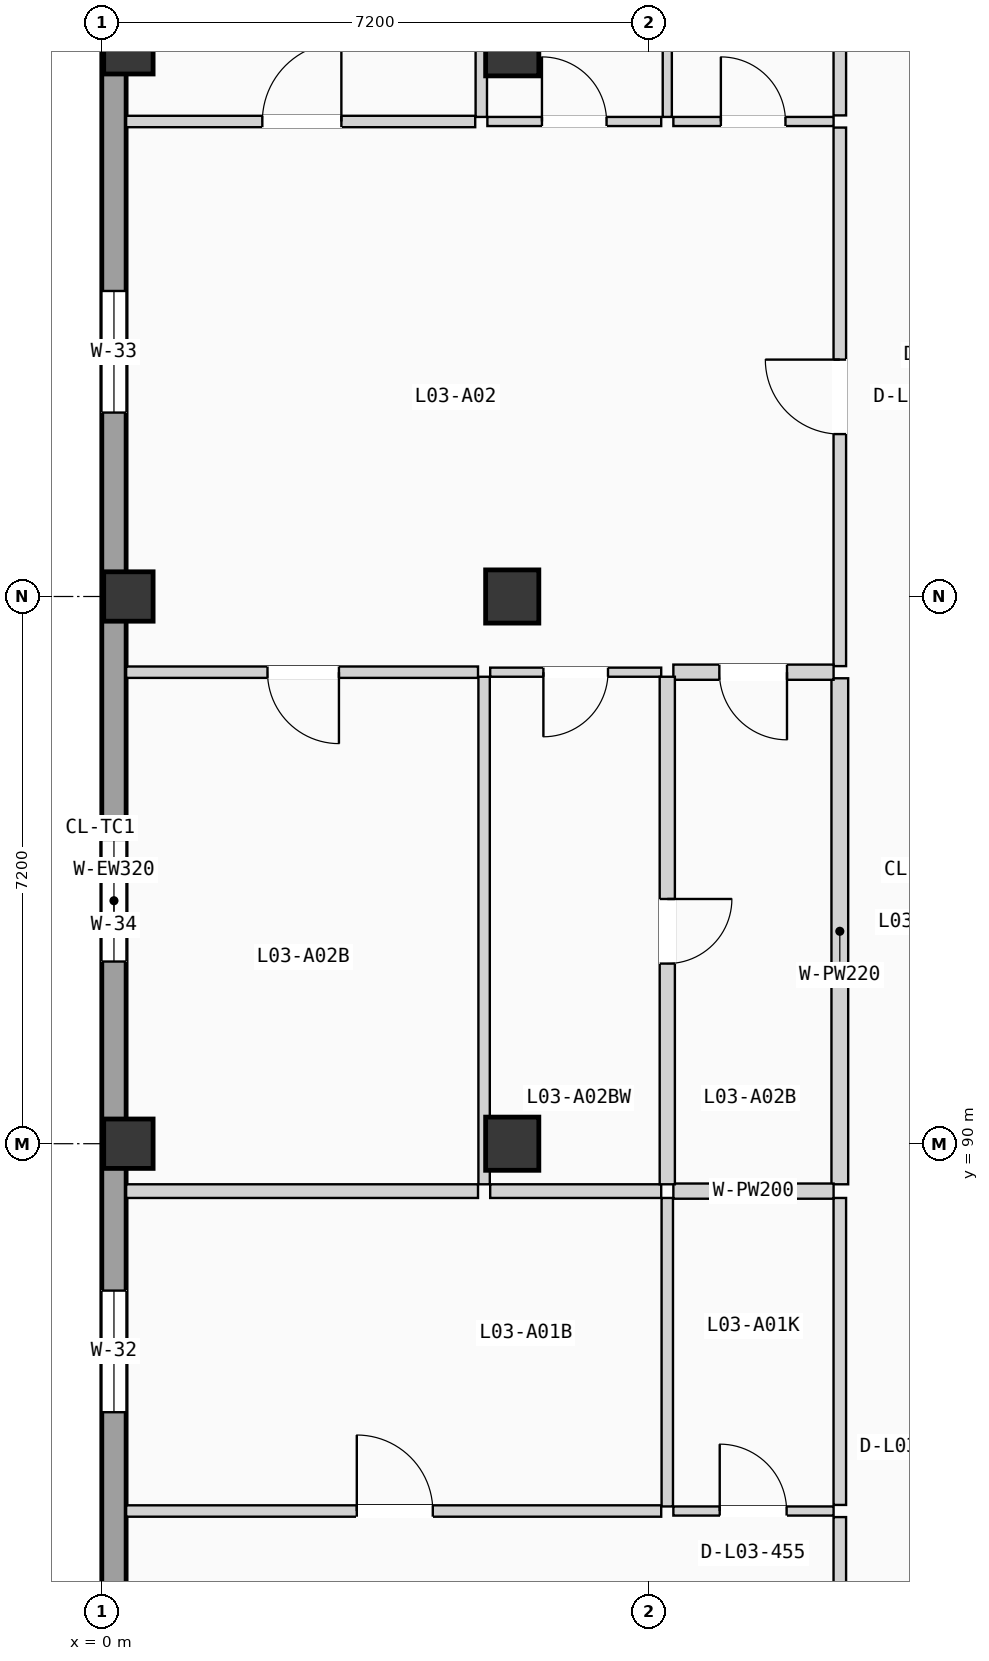
"""IFC4 building model, lengths in metres.
Left out: names, types, materials, properties, quantities, classifications, styles, units other than length and angle.
Written with IfcOpenShell. Run it as: python <this file> out.ifc"""

import sys

from ifc_helpers import new_model, si_unit, direction, frame, frame_2d, origin, origin_2d, place, context, subcontext, project, spatial, rectangle, extrude, element, fill, save


model = new_model("IFC4")
c1 = context("Model", 3, precision=1e-05, world=origin(), true_north=direction((0.0, 1.0)))
c2 = subcontext(c1, "Body", "Model", "MODEL_VIEW")
j1 = project(units=[si_unit("LENGTHUNIT", "METRE"), si_unit("PLANEANGLEUNIT", "RADIAN")], contexts=[c1])
p1 = place(None, origin())
s1 = spatial("IfcSite", under=j1, at=p1, CompositionType="ELEMENT")
p2 = place(p1, origin())
s2 = spatial("IfcBuilding", under=s1, at=p2, CompositionType="ELEMENT")
p3 = place(p2, frame((0.0, 0.0, 12.075)))
s3 = spatial("IfcBuildingStorey", under=s2, at=p3, CompositionType="ELEMENT", Elevation=12.075)
for number, where, z_axis, x_axis in (
    (1, (0.35, 90.0, 0.0), (0.0, 0.0, 1.0), (1.0, 0.0, 0.0)),
    (2, (0.35, 97.2, 0.0), (0.0, 0.0, 1.0), (1.0, 0.0, 0.0)),
    (3, (0.35, 104.4, 0.0), (0.0, 0.0, 1.0), (1.0, 0.0, 0.0)),
):
    element("IfcColumn", number, at=place(p3, frame(where, z_axis=z_axis, x_axis=x_axis)), inside=s3, PredefinedType="COLUMN", context=c2, shape_type="SweptSolid", body=[
        extrude(rectangle(XDim=0.65, YDim=0.65, at=origin_2d()), origin(), (0.0, 0.0, 1.0), 3.15),
    ])
for number, where, z_axis, x_axis in (
    (4, (5.4, 90.0, 0.0), (0.0, 0.0, 1.0), (1.0, 0.0, 0.0)),
    (5, (5.4, 97.2, 0.0), (0.0, 0.0, 1.0), (1.0, 0.0, 0.0)),
    (6, (5.4, 104.4, 0.0), (0.0, 0.0, 1.0), (1.0, 0.0, 0.0)),
):
    element("IfcColumn", number, at=place(p3, frame(where, z_axis=z_axis, x_axis=x_axis)), inside=s3, PredefinedType="COLUMN", context=c2, shape_type="SweptSolid", body=[
        extrude(rectangle(XDim=0.7, YDim=0.7, at=origin_2d()), origin(), (0.0, 0.0, 1.0), 3.15),
    ])
p4 = place(p3, frame((0.16, 68.72, 0.0), z_axis=(0.0, 0.0, 1.0), x_axis=(0.0, 1.0, 0.0)))
e7 = element("IfcWall", 7, at=p4, inside=s3, PredefinedType="SOLIDWALL", context=c2, shape_type="SweptSolid", body=[
    extrude(rectangle(XDim=49.76, YDim=0.32, at=frame_2d((24.88, 0.0))), origin(), (0.0, 0.0, 1.0), 2.89),
])
p5 = place(p4, frame((12.169, 0.0, 0.85)))
e8 = element("IfcOpeningElement", 8, at=p5, cuts=e7, PredefinedType="OPENING", context=c2, shape_type="SweptSolid", body=[
    extrude(rectangle(XDim=0.95, YDim=1.2, at=frame_2d((0.475, 0.6))), frame((0.0, 0.17, 0.0), z_axis=(0.0, -1.0, 0.0), x_axis=(1.0, 0.0, 0.0)), (0.0, 0.0, 1.0), 0.34),
])
p6 = place(p4, frame((8.499, 0.0, 0.9)))
e9 = element("IfcOpeningElement", 9, at=p6, cuts=e7, PredefinedType="OPENING", context=c2, shape_type="SweptSolid", body=[
    extrude(rectangle(XDim=1.6, YDim=1.2, at=frame_2d((0.8, 0.6))), frame((0.0, 0.17, 0.0), z_axis=(0.0, -1.0, 0.0), x_axis=(1.0, 0.0, 0.0)), (0.0, 0.0, 1.0), 0.34),
])
p7 = place(p4, frame((17.747, 0.0, 0.855)))
e10 = element("IfcOpeningElement", 10, at=p7, cuts=e7, PredefinedType="OPENING", context=c2, shape_type="SweptSolid", body=[
    extrude(rectangle(XDim=1.6, YDim=1.35, at=frame_2d((0.8, 0.675))), frame((0.0, 0.17, 0.0), z_axis=(0.0, -1.0, 0.0), x_axis=(1.0, 0.0, 0.0)), (0.0, 0.0, 1.0), 0.34),
])
p8 = place(p4, frame((30.9, 0.0, 0.705)))
e11 = element("IfcOpeningElement", 11, at=p8, cuts=e7, PredefinedType="OPENING", context=c2, shape_type="SweptSolid", body=[
    extrude(rectangle(XDim=1.6, YDim=1.5, at=frame_2d((0.8, 0.75))), frame((0.0, 0.17, 0.0), z_axis=(0.0, -1.0, 0.0), x_axis=(1.0, 0.0, 0.0)), (0.0, 0.0, 1.0), 0.34),
])
p9 = place(p4, frame((23.677, 0.0, 0.555)))
e12 = element("IfcOpeningElement", 12, at=p9, cuts=e7, PredefinedType="OPENING", context=c2, shape_type="SweptSolid", body=[
    extrude(rectangle(XDim=1.6, YDim=1.65, at=frame_2d((0.8, 0.825))), frame((0.0, 0.17, 0.0), z_axis=(0.0, -1.0, 0.0), x_axis=(1.0, 0.0, 0.0)), (0.0, 0.0, 1.0), 0.34),
])
p10 = place(p4, frame((38.74, 0.0, 0.85)))
e13 = element("IfcOpeningElement", 13, at=p10, cuts=e7, PredefinedType="OPENING", context=c2, shape_type="SweptSolid", body=[
    extrude(rectangle(XDim=0.95, YDim=1.2, at=frame_2d((0.475, 0.6))), frame((0.0, 0.17, 0.0), z_axis=(0.0, -1.0, 0.0), x_axis=(1.0, 0.0, 0.0)), (0.0, 0.0, 1.0), 0.34),
])
p11 = place(p3, frame((9.71, 80.199, 0.0), z_axis=(0.0, 0.0, 1.0), x_axis=(0.0, 1.0, 0.0)))
e14 = element("IfcWall", 14, at=p11, inside=s3, PredefinedType="PARTITIONING", context=c2, shape_type="SweptSolid", body=[
    extrude(rectangle(XDim=4.888, YDim=0.165, at=frame_2d((2.444, 0.0))), origin(), (0.0, 0.0, 1.0), 2.87),
])
p12 = place(p11, frame((1.954, 0.0, 0.0)))
e15 = element("IfcOpeningElement", 15, at=p12, cuts=e14, PredefinedType="OPENING", context=c2, shape_type="SweptSolid", body=[
    extrude(rectangle(XDim=0.98, YDim=2.08, at=frame_2d((0.49, 1.04))), frame((0.0, 0.093, 0.0), z_axis=(0.0, -1.0, 0.0), x_axis=(1.0, 0.0, 0.0)), (0.0, 0.0, 1.0), 0.185),
])
p13 = place(p3, frame((9.71, 85.247, 0.0), z_axis=(0.0, 0.0, 1.0), x_axis=(0.0, 1.0, 0.0)))
e16 = element("IfcWall", 16, at=p13, inside=s3, PredefinedType="PARTITIONING", context=c2, shape_type="SweptSolid", body=[
    extrude(rectangle(XDim=4.039, YDim=0.165, at=frame_2d((2.02, 0.0))), origin(), (0.0, 0.0, 1.0), 2.87),
])
p14 = place(p3, frame((9.71, 96.284, 0.0), z_axis=(0.0, 0.0, 1.0), x_axis=(0.0, 1.0, 0.0)))
e17 = element("IfcWall", 17, at=p14, inside=s3, PredefinedType="PARTITIONING", context=c2, shape_type="SweptSolid", body=[
    extrude(rectangle(XDim=7.086, YDim=0.165, at=frame_2d((3.543, 0.0))), origin(), (0.0, 0.0, 1.0), 2.87),
])
p15 = place(p14, frame((3.053, 0.0, 0.0)))
e18 = element("IfcOpeningElement", 18, at=p15, cuts=e17, PredefinedType="OPENING", context=c2, shape_type="SweptSolid", body=[
    extrude(rectangle(XDim=0.98, YDim=2.08, at=frame_2d((0.49, 1.04))), frame((0.0, 0.093, 0.0), z_axis=(0.0, -1.0, 0.0), x_axis=(1.0, 0.0, 0.0)), (0.0, 0.0, 1.0), 0.185),
])
p16 = place(p3, frame((9.71, 89.466, 0.0), z_axis=(0.0, 0.0, 1.0), x_axis=(0.0, 1.0, 0.0)))
e19 = element("IfcWall", 19, at=p16, inside=s3, PredefinedType="PLUMBINGWALL", context=c2, shape_type="SweptSolid", body=[
    extrude(rectangle(XDim=6.658, YDim=0.22, at=frame_2d((3.329, 0.0))), origin(), (0.0, 0.0, 1.0), 2.87),
])
p17 = place(p3, frame((9.71, 103.53, 0.0), z_axis=(0.0, 0.0, 1.0), x_axis=(0.0, 1.0, 0.0)))
e20 = element("IfcWall", 20, at=p17, inside=s3, PredefinedType="PARTITIONING", context=c2, shape_type="SweptSolid", body=[
    extrude(rectangle(XDim=7.67, YDim=0.165, at=frame_2d((3.835, 0.0))), origin(), (0.0, 0.0, 1.0), 2.87),
])
p18 = place(p3, frame((7.52, 85.167, 0.0), z_axis=(0.0, 0.0, 1.0), x_axis=(1.0, 0.0, 0.0)))
e21 = element("IfcWall", 21, at=p18, inside=s3, PredefinedType="PARTITIONING", context=c2, shape_type="SweptSolid", body=[
    extrude(rectangle(XDim=2.108, YDim=0.12, at=frame_2d((1.054, 0.0))), origin(), (0.0, 0.0, 1.0), 2.87),
])
p19 = place(p18, frame((0.61, 0.0, 0.0)))
e22 = element("IfcOpeningElement", 22, at=p19, cuts=e21, PredefinedType="OPENING", context=c2, shape_type="SweptSolid", body=[
    extrude(rectangle(XDim=0.88, YDim=2.02, at=frame_2d((0.44, 1.01))), frame((0.0, 0.07, 0.0), z_axis=(0.0, -1.0, 0.0), x_axis=(1.0, 0.0, 0.0)), (0.0, 0.0, 1.0), 0.14),
])
p20 = place(p3, frame((0.32, 85.167, 0.0), z_axis=(0.0, 0.0, 1.0), x_axis=(1.0, 0.0, 0.0)))
e23 = element("IfcWall", 23, at=p20, inside=s3, PredefinedType="PARTITIONING", context=c2, shape_type="SweptSolid", body=[
    extrude(rectangle(XDim=7.04, YDim=0.15, at=frame_2d((3.52, 0.0))), origin(), (0.0, 0.0, 1.0), 2.87),
])
p21 = place(p20, frame((3.035, 0.0, 0.0)))
e24 = element("IfcOpeningElement", 24, at=p21, cuts=e23, PredefinedType="OPENING", context=c2, shape_type="SweptSolid", body=[
    extrude(rectangle(XDim=1.0, YDim=2.06, at=frame_2d((0.5, 1.03))), frame((0.0, 0.085, 0.0), z_axis=(0.0, -1.0, 0.0), x_axis=(1.0, 0.0, 0.0)), (0.0, 0.0, 1.0), 0.17),
])
p22 = place(p3, frame((7.44, 85.227, 0.0), z_axis=(0.0, 0.0, 1.0), x_axis=(0.0, 1.0, 0.0)))
e25 = element("IfcWall", 25, at=p22, inside=s3, PredefinedType="PARTITIONING", context=c2, shape_type="SweptSolid", body=[
    extrude(rectangle(XDim=4.059, YDim=0.15, at=frame_2d((2.029, 0.0))), origin(), (0.0, 0.0, 1.0), 2.87),
])
p23 = place(p3, frame((7.52, 89.376, 0.0), z_axis=(0.0, 0.0, 1.0), x_axis=(1.0, 0.0, 0.0)))
e26 = element("IfcWall", 26, at=p23, inside=s3, PredefinedType="PLUMBINGWALL", context=c2, shape_type="SweptSolid", body=[
    extrude(rectangle(XDim=2.108, YDim=0.2, at=frame_2d((1.054, 0.0))), origin(), (0.0, 0.0, 1.0), 2.87),
])
p24 = place(p3, frame((0.32, 89.376, 0.0), z_axis=(0.0, 0.0, 1.0), x_axis=(1.0, 0.0, 0.0)))
e27 = element("IfcWall", 27, at=p24, inside=s3, PredefinedType="PARTITIONING", context=c2, shape_type="SweptSolid", body=[
    extrude(rectangle(XDim=4.63, YDim=0.18, at=frame_2d((2.315, 0.0))), origin(), (0.0, 0.0, 1.0), 2.87),
])
p25 = place(p3, frame((5.11, 89.376, 0.0), z_axis=(0.0, 0.0, 1.0), x_axis=(1.0, 0.0, 0.0)))
e28 = element("IfcWall", 28, at=p25, inside=s3, PredefinedType="PARTITIONING", context=c2, shape_type="SweptSolid", body=[
    extrude(rectangle(XDim=2.25, YDim=0.18, at=frame_2d((1.125, 0.0))), origin(), (0.0, 0.0, 1.0), 2.87),
])
p26 = place(p3, frame((7.52, 96.204, 0.0), z_axis=(0.0, 0.0, 1.0), x_axis=(1.0, 0.0, 0.0)))
e29 = element("IfcWall", 29, at=p26, inside=s3, PredefinedType="PLUMBINGWALL", context=c2, shape_type="SweptSolid", body=[
    extrude(rectangle(XDim=2.108, YDim=0.2, at=frame_2d((1.054, 0.0))), origin(), (0.0, 0.0, 1.0), 2.87),
])
p27 = place(p26, frame((0.605, 0.0, 0.0)))
e30 = element("IfcOpeningElement", 30, at=p27, cuts=e29, PredefinedType="OPENING", context=c2, shape_type="SweptSolid", body=[
    extrude(rectangle(XDim=0.89, YDim=2.03, at=frame_2d((0.445, 1.015))), frame((0.0, 0.11, 0.0), z_axis=(0.0, -1.0, 0.0), x_axis=(1.0, 0.0, 0.0)), (0.0, 0.0, 1.0), 0.22),
])
p28 = place(p3, frame((7.52, 103.45, 0.0), z_axis=(0.0, 0.0, 1.0), x_axis=(1.0, 0.0, 0.0)))
e31 = element("IfcWall", 31, at=p28, inside=s3, PredefinedType="PARTITIONING", context=c2, shape_type="SweptSolid", body=[
    extrude(rectangle(XDim=2.108, YDim=0.12, at=frame_2d((1.054, 0.0))), origin(), (0.0, 0.0, 1.0), 2.87),
])
p29 = place(p28, frame((0.625, 0.0, 0.0)))
e32 = element("IfcOpeningElement", 32, at=p29, cuts=e31, PredefinedType="OPENING", context=c2, shape_type="SweptSolid", body=[
    extrude(rectangle(XDim=0.85, YDim=2.01, at=frame_2d((0.425, 1.005))), frame((0.0, 0.07, 0.0), z_axis=(0.0, -1.0, 0.0), x_axis=(1.0, 0.0, 0.0)), (0.0, 0.0, 1.0), 0.14),
])
p30 = place(p3, frame((0.32, 96.204, 0.0), z_axis=(0.0, 0.0, 1.0), x_axis=(1.0, 0.0, 0.0)))
e33 = element("IfcWall", 33, at=p30, inside=s3, PredefinedType="PARTITIONING", context=c2, shape_type="SweptSolid", body=[
    extrude(rectangle(XDim=4.63, YDim=0.15, at=frame_2d((2.315, 0.0))), origin(), (0.0, 0.0, 1.0), 2.87),
])
p31 = place(p30, frame((1.86, 0.0, 0.0)))
e34 = element("IfcOpeningElement", 34, at=p31, cuts=e33, PredefinedType="OPENING", context=c2, shape_type="SweptSolid", body=[
    extrude(rectangle(XDim=0.94, YDim=2.06, at=frame_2d((0.47, 1.03))), frame((0.0, 0.085, 0.0), z_axis=(0.0, -1.0, 0.0), x_axis=(1.0, 0.0, 0.0)), (0.0, 0.0, 1.0), 0.17),
])
p32 = place(p3, frame((5.11, 96.204, 0.0), z_axis=(0.0, 0.0, 1.0), x_axis=(1.0, 0.0, 0.0)))
e35 = element("IfcWall", 35, at=p32, inside=s3, PredefinedType="PARTITIONING", context=c2, shape_type="SweptSolid", body=[
    extrude(rectangle(XDim=2.25, YDim=0.12, at=frame_2d((1.125, 0.0))), origin(), (0.0, 0.0, 1.0), 2.87),
])
p33 = place(p32, frame((0.7, 0.0, 0.0)))
e36 = element("IfcOpeningElement", 36, at=p33, cuts=e35, PredefinedType="OPENING", context=c2, shape_type="SweptSolid", body=[
    extrude(rectangle(XDim=0.85, YDim=2.01, at=frame_2d((0.425, 1.005))), frame((0.0, 0.07, 0.0), z_axis=(0.0, -1.0, 0.0), x_axis=(1.0, 0.0, 0.0)), (0.0, 0.0, 1.0), 0.14),
])
p34 = place(p3, frame((0.32, 103.45, 0.0), z_axis=(0.0, 0.0, 1.0), x_axis=(1.0, 0.0, 0.0)))
e37 = element("IfcWall", 37, at=p34, inside=s3, PredefinedType="PARTITIONING", context=c2, shape_type="SweptSolid", body=[
    extrude(rectangle(XDim=4.593, YDim=0.15, at=frame_2d((2.296, 0.0))), origin(), (0.0, 0.0, 1.0), 2.87),
])
p35 = place(p34, frame((1.792, 0.0, 0.0)))
e38 = element("IfcOpeningElement", 38, at=p35, cuts=e37, PredefinedType="OPENING", context=c2, shape_type="SweptSolid", body=[
    extrude(rectangle(XDim=1.04, YDim=2.08, at=frame_2d((0.52, 1.04))), frame((0.0, 0.085, 0.0), z_axis=(0.0, -1.0, 0.0), x_axis=(1.0, 0.0, 0.0)), (0.0, 0.0, 1.0), 0.17),
])
p36 = place(p3, frame((5.073, 103.45, 0.0), z_axis=(0.0, 0.0, 1.0), x_axis=(1.0, 0.0, 0.0)))
e39 = element("IfcWall", 39, at=p36, inside=s3, PredefinedType="PARTITIONING", context=c2, shape_type="SweptSolid", body=[
    extrude(rectangle(XDim=2.287, YDim=0.12, at=frame_2d((1.144, 0.0))), origin(), (0.0, 0.0, 1.0), 2.87),
])
p37 = place(p36, frame((0.718, 0.0, 0.0)))
e40 = element("IfcOpeningElement", 40, at=p37, cuts=e39, PredefinedType="OPENING", context=c2, shape_type="SweptSolid", body=[
    extrude(rectangle(XDim=0.85, YDim=2.01, at=frame_2d((0.425, 1.005))), frame((0.0, 0.07, 0.0), z_axis=(0.0, -1.0, 0.0), x_axis=(1.0, 0.0, 0.0)), (0.0, 0.0, 1.0), 0.14),
])
p38 = place(p3, frame((7.44, 89.466, 0.0), z_axis=(0.0, 0.0, 1.0), x_axis=(0.0, 1.0, 0.0)))
e41 = element("IfcWall", 41, at=p38, inside=s3, PredefinedType="PLUMBINGWALL", context=c2, shape_type="SweptSolid", body=[
    extrude(rectangle(XDim=6.678, YDim=0.2, at=frame_2d((3.339, 0.0))), origin(), (0.0, 0.0, 1.0), 2.87),
])
p39 = place(p38, frame((2.904, 0.0, 0.0)))
e42 = element("IfcOpeningElement", 42, at=p39, cuts=e41, PredefinedType="OPENING", context=c2, shape_type="SweptSolid", body=[
    extrude(rectangle(XDim=0.85, YDim=2.01, at=frame_2d((0.425, 1.005))), frame((0.0, 0.11, 0.0), z_axis=(0.0, -1.0, 0.0), x_axis=(1.0, 0.0, 0.0)), (0.0, 0.0, 1.0), 0.22),
])
p40 = place(p3, frame((7.44, 103.51, 0.0), z_axis=(0.0, 0.0, 1.0), x_axis=(0.0, 1.0, 0.0)))
e43 = element("IfcWall", 43, at=p40, inside=s3, PredefinedType="PARTITIONING", context=c2, shape_type="SweptSolid", body=[
    extrude(rectangle(XDim=7.69, YDim=0.12, at=frame_2d((3.845, 0.0))), origin(), (0.0, 0.0, 1.0), 2.87),
])
p41 = place(p3, frame((5.03, 89.466, 0.0), z_axis=(0.0, 0.0, 1.0), x_axis=(0.0, 1.0, 0.0)))
e44 = element("IfcWall", 44, at=p41, inside=s3, PredefinedType="PARTITIONING", context=c2, shape_type="SweptSolid", body=[
    extrude(rectangle(XDim=6.678, YDim=0.15, at=frame_2d((3.339, 0.0))), origin(), (0.0, 0.0, 1.0), 2.87),
])
p42 = place(p3, frame((4.993, 103.51, 0.0), z_axis=(0.0, 0.0, 1.0), x_axis=(0.0, 1.0, 0.0)))
e45 = element("IfcWall", 45, at=p42, inside=s3, PredefinedType="PARTITIONING", context=c2, shape_type="SweptSolid", body=[
    extrude(rectangle(XDim=7.69, YDim=0.15, at=frame_2d((3.845, 0.0))), origin(), (0.0, 0.0, 1.0), 2.87),
])
p43 = place(p7, origin())
e46 = element("IfcWindow", 46, at=p43, inside=s3, PartitioningType="DOUBLE_PANEL_VERTICAL", PredefinedType="WINDOW", context=c2, shape_type="SweptSolid", body=[
    extrude(rectangle(XDim=1.6, YDim=1.35, at=frame_2d((0.8, 0.675))), frame((0.0, 0.03, 0.0), z_axis=(0.0, -1.0, 0.0), x_axis=(1.0, 0.0, 0.0)), (0.0, 0.0, 1.0), 0.06),
])
fill(e10, e46)
p44 = place(p8, origin())
e47 = element("IfcWindow", 47, at=p44, inside=s3, PartitioningType="DOUBLE_PANEL_VERTICAL", PredefinedType="WINDOW", context=c2, shape_type="SweptSolid", body=[
    extrude(rectangle(XDim=1.6, YDim=1.5, at=frame_2d((0.8, 0.75))), frame((0.0, 0.03, 0.0), z_axis=(0.0, -1.0, 0.0), x_axis=(1.0, 0.0, 0.0)), (0.0, 0.0, 1.0), 0.06),
])
fill(e11, e47)
p45 = place(p9, origin())
e48 = element("IfcWindow", 48, at=p45, inside=s3, PartitioningType="DOUBLE_PANEL_VERTICAL", PredefinedType="WINDOW", context=c2, shape_type="SweptSolid", body=[
    extrude(rectangle(XDim=1.6, YDim=1.65, at=frame_2d((0.8, 0.825))), frame((0.0, 0.03, 0.0), z_axis=(0.0, -1.0, 0.0), x_axis=(1.0, 0.0, 0.0)), (0.0, 0.0, 1.0), 0.06),
])
fill(e12, e48)
p46 = place(p15, origin())
e49 = element("IfcDoor", 49, at=p46, inside=s3, OperationType="SINGLE_SWING_RIGHT", PredefinedType="DOOR", context=c2, shape_type="SweptSolid", body=[
    extrude(rectangle(XDim=0.98, YDim=2.08, at=frame_2d((0.49, 1.04))), frame((0.0, 0.025, 0.0), z_axis=(0.0, -1.0, 0.0), x_axis=(1.0, 0.0, 0.0)), (0.0, 0.0, 1.0), 0.05),
])
fill(e18, e49)
p47 = place(p19, origin())
e50 = element("IfcDoor", 50, at=p47, inside=s3, OperationType="SINGLE_SWING_LEFT", PredefinedType="DOOR", context=c2, shape_type="SweptSolid", body=[
    extrude(rectangle(XDim=0.88, YDim=2.02, at=frame_2d((0.44, 1.01))), frame((0.0, 0.025, 0.0), z_axis=(0.0, -1.0, 0.0), x_axis=(1.0, 0.0, 0.0)), (0.0, 0.0, 1.0), 0.05),
])
fill(e22, e50)
p48 = place(p21, origin())
e51 = element("IfcDoor", 51, at=p48, inside=s3, OperationType="SINGLE_SWING_LEFT", PredefinedType="DOOR", context=c2, shape_type="SweptSolid", body=[
    extrude(rectangle(XDim=1.0, YDim=2.06, at=frame_2d((0.5, 1.03))), frame((0.0, 0.025, 0.0), z_axis=(0.0, -1.0, 0.0), x_axis=(1.0, 0.0, 0.0)), (0.0, 0.0, 1.0), 0.05),
])
fill(e24, e51)
p49 = place(p27, frame((0.89, 0.0, 0.0), z_axis=(0.0, 0.0, 1.0), x_axis=(-1.0, 0.0, 0.0)))
e52 = element("IfcDoor", 52, at=p49, inside=s3, OperationType="SINGLE_SWING_RIGHT", PredefinedType="DOOR", context=c2, shape_type="SweptSolid", body=[
    extrude(rectangle(XDim=0.89, YDim=2.03, at=frame_2d((0.445, 1.015))), frame((0.0, 0.025, 0.0), z_axis=(0.0, -1.0, 0.0), x_axis=(1.0, 0.0, 0.0)), (0.0, 0.0, 1.0), 0.05),
])
fill(e30, e52)
p50 = place(p29, origin())
e53 = element("IfcDoor", 53, at=p50, inside=s3, OperationType="SINGLE_SWING_LEFT", PredefinedType="DOOR", context=c2, shape_type="SweptSolid", body=[
    extrude(rectangle(XDim=0.85, YDim=2.01, at=frame_2d((0.425, 1.005))), frame((0.0, 0.025, 0.0), z_axis=(0.0, -1.0, 0.0), x_axis=(1.0, 0.0, 0.0)), (0.0, 0.0, 1.0), 0.05),
])
fill(e32, e53)
p51 = place(p31, frame((0.94, 0.0, 0.0), z_axis=(0.0, 0.0, 1.0), x_axis=(-1.0, 0.0, 0.0)))
e54 = element("IfcDoor", 54, at=p51, inside=s3, OperationType="SINGLE_SWING_RIGHT", PredefinedType="DOOR", context=c2, shape_type="SweptSolid", body=[
    extrude(rectangle(XDim=0.94, YDim=2.06, at=frame_2d((0.47, 1.03))), frame((0.0, 0.025, 0.0), z_axis=(0.0, -1.0, 0.0), x_axis=(1.0, 0.0, 0.0)), (0.0, 0.0, 1.0), 0.05),
])
fill(e34, e54)
p52 = place(p33, frame((0.85, 0.0, 0.0), z_axis=(0.0, 0.0, 1.0), x_axis=(-1.0, 0.0, 0.0)))
e55 = element("IfcDoor", 55, at=p52, inside=s3, OperationType="SINGLE_SWING_LEFT", PredefinedType="DOOR", context=c2, shape_type="SweptSolid", body=[
    extrude(rectangle(XDim=0.85, YDim=2.01, at=frame_2d((0.425, 1.005))), frame((0.0, 0.025, 0.0), z_axis=(0.0, -1.0, 0.0), x_axis=(1.0, 0.0, 0.0)), (0.0, 0.0, 1.0), 0.05),
])
fill(e36, e55)
p53 = place(p35, origin())
e56 = element("IfcDoor", 56, at=p53, inside=s3, OperationType="SINGLE_SWING_RIGHT", PredefinedType="DOOR", context=c2, shape_type="SweptSolid", body=[
    extrude(rectangle(XDim=1.04, YDim=2.08, at=frame_2d((0.52, 1.04))), frame((0.0, 0.025, 0.0), z_axis=(0.0, -1.0, 0.0), x_axis=(1.0, 0.0, 0.0)), (0.0, 0.0, 1.0), 0.05),
])
fill(e38, e56)
p54 = place(p37, origin())
e57 = element("IfcDoor", 57, at=p54, inside=s3, OperationType="SINGLE_SWING_LEFT", PredefinedType="DOOR", context=c2, shape_type="SweptSolid", body=[
    extrude(rectangle(XDim=0.85, YDim=2.01, at=frame_2d((0.425, 1.005))), frame((0.0, 0.025, 0.0), z_axis=(0.0, -1.0, 0.0), x_axis=(1.0, 0.0, 0.0)), (0.0, 0.0, 1.0), 0.05),
])
fill(e40, e57)
p55 = place(p39, frame((0.85, 0.0, 0.0), z_axis=(0.0, 0.0, 1.0), x_axis=(-1.0, 0.0, 0.0)))
e58 = element("IfcDoor", 58, at=p55, inside=s3, OperationType="SINGLE_SWING_RIGHT", PredefinedType="DOOR", context=c2, shape_type="SweptSolid", body=[
    extrude(rectangle(XDim=0.85, YDim=2.01, at=frame_2d((0.425, 1.005))), frame((0.0, 0.025, 0.0), z_axis=(0.0, -1.0, 0.0), x_axis=(1.0, 0.0, 0.0)), (0.0, 0.0, 1.0), 0.05),
])
fill(e42, e58)
save(model, sys.argv[1])
